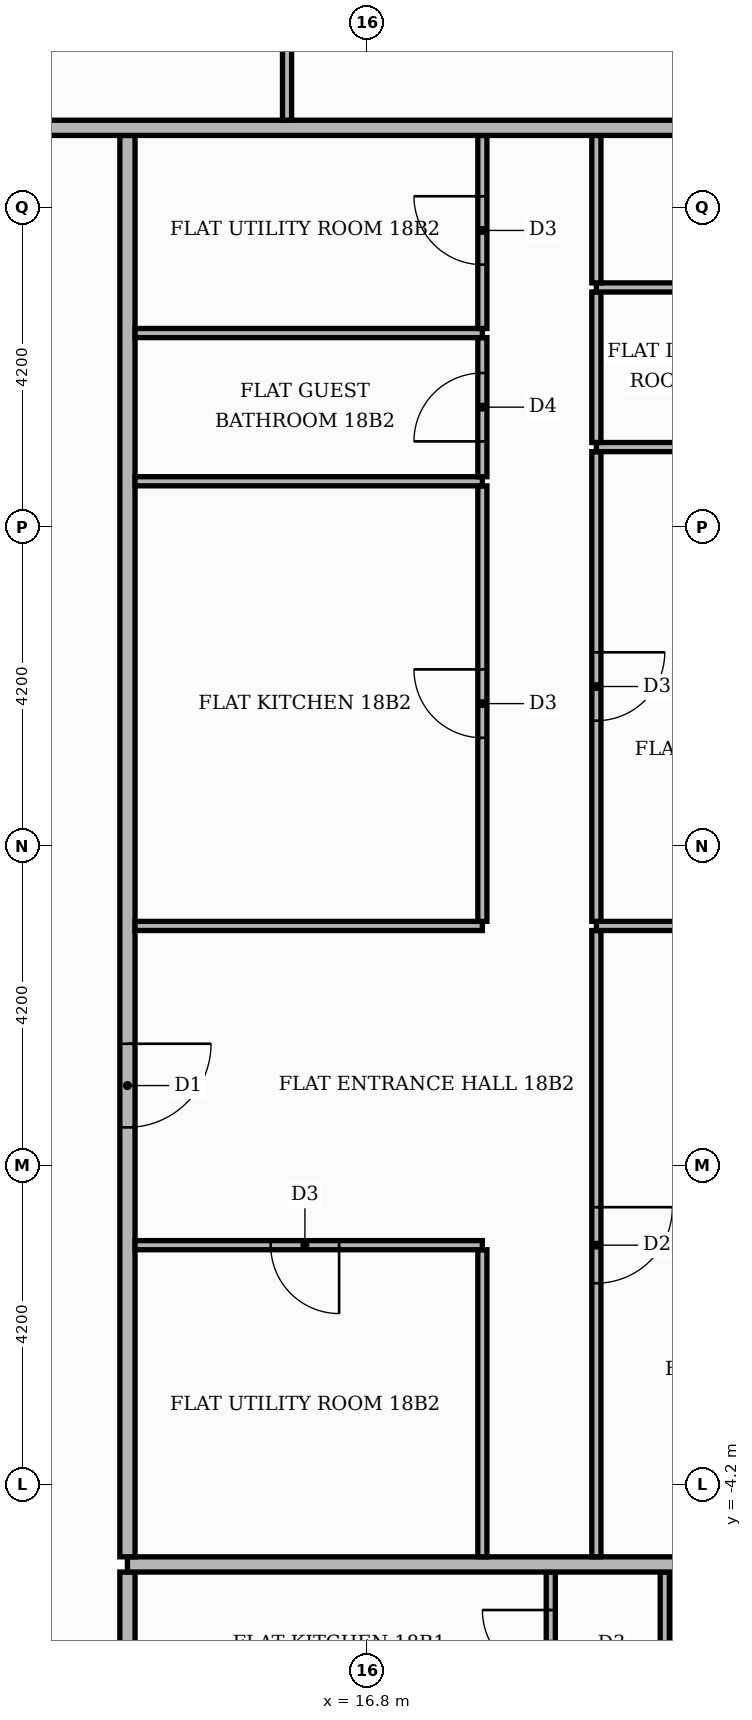
"""IFC4 building model, lengths in metres.
Left out: names, types, materials, properties, quantities, classifications, styles, units other than length and angle.
Written with IfcOpenShell. Run it as: python <this file> out.ifc"""

import sys

from ifc_helpers import new_model, si_unit, direction, frame, frame_2d, origin, place, context, subcontext, project, spatial, rectangle, extrude, element, fill, save


model = new_model("IFC4")
c1 = context("Model", 3, precision=1e-05, world=origin(), true_north=direction((0.0, 1.0)))
c2 = subcontext(c1, "Body", "Model", "MODEL_VIEW")
j1 = project(units=[si_unit("LENGTHUNIT", "METRE"), si_unit("PLANEANGLEUNIT", "RADIAN")], contexts=[c1])
p1 = place(None, origin())
s1 = spatial("IfcSite", under=j1, at=p1, CompositionType="ELEMENT")
p2 = place(p1, origin())
s2 = spatial("IfcBuilding", under=s1, at=p2, CompositionType="ELEMENT")
p3 = place(p2, frame((0.0, 0.0, 79.2)))
s3 = spatial("IfcBuildingStorey", under=s2, at=p3, CompositionType="ELEMENT", Elevation=79.2)
p4 = place(p3, frame((13.65, -13.55, 0.0), z_axis=(0.0, 0.0, 1.0), x_axis=(0.0, 1.0, 0.0)))
e1 = element("IfcWall", 1, at=p4, inside=s3, PredefinedType="PARTITIONING", context=c2, shape_type="SweptSolid", body=[
    extrude(rectangle(XDim=8.2, YDim=0.2, at=frame_2d((4.1, 0.0))), origin(), (0.0, 0.0, 1.0), 3.48),
])
p5 = place(p4, frame((1.45, 0.0, 0.0)))
e2 = element("IfcOpeningElement", 2, at=p5, cuts=e1, PredefinedType="OPENING", context=c2, shape_type="SweptSolid", body=[
    extrude(rectangle(XDim=1.1, YDim=2.4, at=frame_2d((0.55, 1.2))), frame((0.0, 0.11, 0.0), z_axis=(0.0, -1.0, 0.0), x_axis=(1.0, 0.0, 0.0)), (0.0, 0.0, 1.0), 0.22),
])
p6 = place(p3, frame((19.22, -7.29, 0.0), z_axis=(0.0, 0.0, 1.0), x_axis=(0.0, 1.0, 0.0)))
e3 = element("IfcWall", 3, at=p6, inside=s3, PredefinedType="PARTITIONING", context=c2, shape_type="SweptSolid", body=[
    extrude(rectangle(XDim=1.94, YDim=0.12, at=frame_2d((0.97, 0.0))), origin(), (0.0, 0.0, 1.0), 3.48),
])
p7 = place(p6, frame((0.54, 0.0, 0.0)))
e4 = element("IfcOpeningElement", 4, at=p7, cuts=e3, PredefinedType="OPENING", context=c2, shape_type="SweptSolid", body=[
    extrude(rectangle(XDim=0.9, YDim=2.1, at=frame_2d((0.45, 1.05))), frame((0.0, 0.07, 0.0), z_axis=(0.0, -1.0, 0.0), x_axis=(1.0, 0.0, 0.0)), (0.0, 0.0, 1.0), 0.14),
])
p8 = place(p3, frame((20.72, -7.29, 0.0), z_axis=(0.0, 0.0, 1.0), x_axis=(0.0, 1.0, 0.0)))
e5 = element("IfcWall", 5, at=p8, inside=s3, PredefinedType="PARTITIONING", context=c2, shape_type="SweptSolid", body=[
    extrude(rectangle(XDim=1.94, YDim=0.12, at=frame_2d((0.97, 0.0))), origin(), (0.0, 0.0, 1.0), 3.48),
])
p9 = place(p3, frame((13.65, -5.25, 0.0), z_axis=(0.0, 0.0, 1.0), x_axis=(1.0, 0.0, 0.0)))
e6 = element("IfcWall", 6, at=p9, inside=s3, PredefinedType="PARTITIONING", context=c2, shape_type="SweptSolid", body=[
    extrude(rectangle(XDim=11.77, YDim=0.2, at=frame_2d((5.885, 0.0))), origin(), (0.0, 0.0, 1.0), 3.48),
])
p10 = place(p3, frame((13.65, -5.15, 0.0), z_axis=(0.0, 0.0, 1.0), x_axis=(0.0, 1.0, 0.0)))
e7 = element("IfcWall", 7, at=p10, inside=s3, PredefinedType="PARTITIONING", context=c2, shape_type="SweptSolid", body=[
    extrude(rectangle(XDim=18.7, YDim=0.2, at=frame_2d((9.35, 0.0))), origin(), (0.0, 0.0, 1.0), 3.48),
])
p11 = place(p10, frame((5.65, 0.0, 0.0)))
e8 = element("IfcOpeningElement", 8, at=p11, cuts=e7, PredefinedType="OPENING", context=c2, shape_type="SweptSolid", body=[
    extrude(rectangle(XDim=1.1, YDim=2.4, at=frame_2d((0.55, 1.2))), frame((0.0, 0.11, 0.0), z_axis=(0.0, -1.0, 0.0), x_axis=(1.0, 0.0, 0.0)), (0.0, 0.0, 1.0), 0.22),
])
p12 = place(p3, frame((18.32, -5.15, 0.0), z_axis=(0.0, 0.0, 1.0), x_axis=(0.0, 1.0, 0.0)))
e9 = element("IfcWall", 9, at=p12, inside=s3, PredefinedType="PARTITIONING", context=c2, shape_type="SweptSolid", body=[
    extrude(rectangle(XDim=4.04, YDim=0.12, at=frame_2d((2.02, 0.0))), origin(), (0.0, 0.0, 1.0), 3.48),
])
p13 = place(p3, frame((19.82, -5.15, 0.0), z_axis=(0.0, 0.0, 1.0), x_axis=(0.0, 1.0, 0.0)))
e10 = element("IfcWall", 10, at=p13, inside=s3, PredefinedType="PARTITIONING", context=c2, shape_type="SweptSolid", body=[
    extrude(rectangle(XDim=8.24, YDim=0.12, at=frame_2d((4.12, 0.0))), origin(), (0.0, 0.0, 1.0), 3.48),
])
p14 = place(p13, frame((3.6, 0.0, 0.0)))
e11 = element("IfcOpeningElement", 11, at=p14, cuts=e10, PredefinedType="OPENING", context=c2, shape_type="SweptSolid", body=[
    extrude(rectangle(XDim=1.0, YDim=2.1, at=frame_2d((0.5, 1.05))), frame((0.0, 0.07, 0.0), z_axis=(0.0, -1.0, 0.0), x_axis=(1.0, 0.0, 0.0)), (0.0, 0.0, 1.0), 0.14),
])
p15 = place(p3, frame((13.75, -1.05, 0.0), z_axis=(0.0, 0.0, 1.0), x_axis=(1.0, 0.0, 0.0)))
e12 = element("IfcWall", 12, at=p15, inside=s3, PredefinedType="PARTITIONING", context=c2, shape_type="SweptSolid", body=[
    extrude(rectangle(XDim=4.57, YDim=0.12, at=frame_2d((2.285, 0.0))), origin(), (0.0, 0.0, 1.0), 3.48),
])
p16 = place(p15, frame((1.785, 0.0, 0.0)))
e13 = element("IfcOpeningElement", 13, at=p16, cuts=e12, PredefinedType="OPENING", context=c2, shape_type="SweptSolid", body=[
    extrude(rectangle(XDim=0.9, YDim=2.1, at=frame_2d((0.45, 1.05))), frame((0.0, 0.07, 0.0), z_axis=(0.0, -1.0, 0.0), x_axis=(1.0, 0.0, 0.0)), (0.0, 0.0, 1.0), 0.14),
])
p17 = place(p3, frame((13.75, 3.15, 0.0), z_axis=(0.0, 0.0, 1.0), x_axis=(1.0, 0.0, 0.0)))
e14 = element("IfcWall", 14, at=p17, inside=s3, PredefinedType="PARTITIONING", context=c2, shape_type="SweptSolid", body=[
    extrude(rectangle(XDim=4.57, YDim=0.12, at=frame_2d((2.285, 0.0))), origin(), (0.0, 0.0, 1.0), 3.48),
])
p18 = place(p3, frame((19.82, 3.15, 0.0), z_axis=(0.0, 0.0, 1.0), x_axis=(1.0, 0.0, 0.0)))
e15 = element("IfcWall", 15, at=p18, inside=s3, PredefinedType="PARTITIONING", context=c2, shape_type="SweptSolid", body=[
    extrude(rectangle(XDim=5.6, YDim=0.12, at=frame_2d((2.8, 0.0))), origin(), (0.0, 0.0, 1.0), 3.48),
])
p19 = place(p3, frame((18.32, 3.21, 0.0), z_axis=(0.0, 0.0, 1.0), x_axis=(0.0, 1.0, 0.0)))
e16 = element("IfcWall", 16, at=p19, inside=s3, PredefinedType="PARTITIONING", context=c2, shape_type="SweptSolid", body=[
    extrude(rectangle(XDim=5.73, YDim=0.12, at=frame_2d((2.865, 0.0))), origin(), (0.0, 0.0, 1.0), 3.48),
])
p20 = place(p19, frame((2.415, 0.0, 0.0)))
e17 = element("IfcOpeningElement", 17, at=p20, cuts=e16, PredefinedType="OPENING", context=c2, shape_type="SweptSolid", body=[
    extrude(rectangle(XDim=0.9, YDim=2.1, at=frame_2d((0.45, 1.05))), frame((0.0, 0.07, 0.0), z_axis=(0.0, -1.0, 0.0), x_axis=(1.0, 0.0, 0.0)), (0.0, 0.0, 1.0), 0.14),
])
p21 = place(p3, frame((19.82, 3.21, 0.0), z_axis=(0.0, 0.0, 1.0), x_axis=(0.0, 1.0, 0.0)))
e18 = element("IfcWall", 18, at=p21, inside=s3, PredefinedType="PARTITIONING", context=c2, shape_type="SweptSolid", body=[
    extrude(rectangle(XDim=6.18, YDim=0.12, at=frame_2d((3.09, 0.0))), origin(), (0.0, 0.0, 1.0), 3.48),
])
p22 = place(p21, frame((2.64, 0.0, 0.0)))
e19 = element("IfcOpeningElement", 19, at=p22, cuts=e18, PredefinedType="OPENING", context=c2, shape_type="SweptSolid", body=[
    extrude(rectangle(XDim=0.9, YDim=2.1, at=frame_2d((0.45, 1.05))), frame((0.0, 0.07, 0.0), z_axis=(0.0, -1.0, 0.0), x_axis=(1.0, 0.0, 0.0)), (0.0, 0.0, 1.0), 0.14),
])
p23 = place(p3, frame((13.75, 9.0, 0.0), z_axis=(0.0, 0.0, 1.0), x_axis=(1.0, 0.0, 0.0)))
e20 = element("IfcWall", 20, at=p23, inside=s3, PredefinedType="PARTITIONING", context=c2, shape_type="SweptSolid", body=[
    extrude(rectangle(XDim=4.57, YDim=0.12, at=frame_2d((2.285, 0.0))), origin(), (0.0, 0.0, 1.0), 3.48),
])
p24 = place(p3, frame((18.32, 9.06, 0.0), z_axis=(0.0, 0.0, 1.0), x_axis=(0.0, 1.0, 0.0)))
e21 = element("IfcWall", 21, at=p24, inside=s3, PredefinedType="PARTITIONING", context=c2, shape_type="SweptSolid", body=[
    extrude(rectangle(XDim=1.83, YDim=0.12, at=frame_2d((0.915, 0.0))), origin(), (0.0, 0.0, 1.0), 3.48),
])
p25 = place(p24, frame((0.465, 0.0, 0.0)))
e22 = element("IfcOpeningElement", 22, at=p25, cuts=e21, PredefinedType="OPENING", context=c2, shape_type="SweptSolid", body=[
    extrude(rectangle(XDim=0.9, YDim=2.1, at=frame_2d((0.45, 1.05))), frame((0.0, 0.07, 0.0), z_axis=(0.0, -1.0, 0.0), x_axis=(1.0, 0.0, 0.0)), (0.0, 0.0, 1.0), 0.14),
])
p26 = place(p3, frame((19.82, 9.45, 0.0), z_axis=(0.0, 0.0, 1.0), x_axis=(1.0, 0.0, 0.0)))
e23 = element("IfcWall", 23, at=p26, inside=s3, PredefinedType="PARTITIONING", context=c2, shape_type="SweptSolid", body=[
    extrude(rectangle(XDim=5.6, YDim=0.12, at=frame_2d((2.8, 0.0))), origin(), (0.0, 0.0, 1.0), 3.48),
])
p27 = place(p26, frame((2.5, 0.0, 0.0)))
e24 = element("IfcOpeningElement", 24, at=p27, cuts=e23, PredefinedType="OPENING", context=c2, shape_type="SweptSolid", body=[
    extrude(rectangle(XDim=0.9, YDim=2.1, at=frame_2d((0.45, 1.05))), frame((0.0, 0.07, 0.0), z_axis=(0.0, -1.0, 0.0), x_axis=(1.0, 0.0, 0.0)), (0.0, 0.0, 1.0), 0.14),
])
p28 = place(p3, frame((19.82, 9.51, 0.0), z_axis=(0.0, 0.0, 1.0), x_axis=(0.0, 1.0, 0.0)))
e25 = element("IfcWall", 25, at=p28, inside=s3, PredefinedType="PARTITIONING", context=c2, shape_type="SweptSolid", body=[
    extrude(rectangle(XDim=1.98, YDim=0.12, at=frame_2d((0.99, 0.0))), origin(), (0.0, 0.0, 1.0), 3.48),
])
p29 = place(p3, frame((13.75, 10.95, 0.0), z_axis=(0.0, 0.0, 1.0), x_axis=(1.0, 0.0, 0.0)))
e26 = element("IfcWall", 26, at=p29, inside=s3, PredefinedType="PARTITIONING", context=c2, shape_type="SweptSolid", body=[
    extrude(rectangle(XDim=4.57, YDim=0.12, at=frame_2d((2.285, 0.0))), origin(), (0.0, 0.0, 1.0), 3.48),
])
p30 = place(p3, frame((18.32, 11.01, 0.0), z_axis=(0.0, 0.0, 1.0), x_axis=(0.0, 1.0, 0.0)))
e27 = element("IfcWall", 27, at=p30, inside=s3, PredefinedType="PARTITIONING", context=c2, shape_type="SweptSolid", body=[
    extrude(rectangle(XDim=2.54, YDim=0.12, at=frame_2d((1.27, 0.0))), origin(), (0.0, 0.0, 1.0), 3.48),
])
p31 = place(p30, frame((0.84, 0.0, 0.0)))
e28 = element("IfcOpeningElement", 28, at=p31, cuts=e27, PredefinedType="OPENING", context=c2, shape_type="SweptSolid", body=[
    extrude(rectangle(XDim=0.9, YDim=2.1, at=frame_2d((0.45, 1.05))), frame((0.0, 0.07, 0.0), z_axis=(0.0, -1.0, 0.0), x_axis=(1.0, 0.0, 0.0)), (0.0, 0.0, 1.0), 0.14),
])
p32 = place(p3, frame((19.82, 11.55, 0.0), z_axis=(0.0, 0.0, 1.0), x_axis=(1.0, 0.0, 0.0)))
e29 = element("IfcWall", 29, at=p32, inside=s3, PredefinedType="PARTITIONING", context=c2, shape_type="SweptSolid", body=[
    extrude(rectangle(XDim=5.6, YDim=0.12, at=frame_2d((2.8, 0.0))), origin(), (0.0, 0.0, 1.0), 3.48),
])
p33 = place(p32, frame((2.5, 0.0, 0.0)))
e30 = element("IfcOpeningElement", 30, at=p33, cuts=e29, PredefinedType="OPENING", context=c2, shape_type="SweptSolid", body=[
    extrude(rectangle(XDim=0.9, YDim=2.1, at=frame_2d((0.45, 1.05))), frame((0.0, 0.07, 0.0), z_axis=(0.0, -1.0, 0.0), x_axis=(1.0, 0.0, 0.0)), (0.0, 0.0, 1.0), 0.14),
])
p34 = place(p3, frame((19.82, 11.61, 0.0), z_axis=(0.0, 0.0, 1.0), x_axis=(0.0, 1.0, 0.0)))
e31 = element("IfcWall", 31, at=p34, inside=s3, PredefinedType="PARTITIONING", context=c2, shape_type="SweptSolid", body=[
    extrude(rectangle(XDim=1.94, YDim=0.12, at=frame_2d((0.97, 0.0))), origin(), (0.0, 0.0, 1.0), 3.48),
])
p35 = place(p3, frame((-13.65, 13.65, 0.0), z_axis=(0.0, 0.0, 1.0), x_axis=(1.0, 0.0, 0.0)))
e32 = element("IfcWall", 32, at=p35, inside=s3, PredefinedType="PARTITIONING", context=c2, shape_type="SweptSolid", body=[
    extrude(rectangle(XDim=39.07, YDim=0.2, at=frame_2d((19.535, 0.0))), origin(), (0.0, 0.0, 1.0), 3.48),
])
p36 = place(p35, frame((24.65, 0.0, 0.0)))
e33 = element("IfcOpeningElement", 33, at=p36, cuts=e32, PredefinedType="OPENING", context=c2, shape_type="SweptSolid", body=[
    extrude(rectangle(XDim=1.1, YDim=2.4, at=frame_2d((0.55, 1.2))), frame((0.0, 0.11, 0.0), z_axis=(0.0, -1.0, 0.0), x_axis=(1.0, 0.0, 0.0)), (0.0, 0.0, 1.0), 0.22),
])
p37 = place(p35, frame((14.15, 0.0, 0.0)))
e34 = element("IfcOpeningElement", 34, at=p37, cuts=e32, PredefinedType="OPENING", context=c2, shape_type="SweptSolid", body=[
    extrude(rectangle(XDim=1.1, YDim=2.4, at=frame_2d((0.55, 1.2))), frame((0.0, 0.11, 0.0), z_axis=(0.0, -1.0, 0.0), x_axis=(1.0, 0.0, 0.0)), (0.0, 0.0, 1.0), 0.22),
])
p38 = place(p3, frame((15.75, 13.75, 0.0), z_axis=(0.0, 0.0, 1.0), x_axis=(0.0, 1.0, 0.0)))
e35 = element("IfcWall", 35, at=p38, inside=s3, PredefinedType="PARTITIONING", context=c2, shape_type="SweptSolid", body=[
    extrude(rectangle(XDim=6.01, YDim=0.12, at=frame_2d((3.005, 0.0))), origin(), (0.0, 0.0, 1.0), 3.48),
])
p39 = place(p38, frame((2.485, 0.0, 0.0)))
e36 = element("IfcOpeningElement", 36, at=p39, cuts=e35, PredefinedType="OPENING", context=c2, shape_type="SweptSolid", body=[
    extrude(rectangle(XDim=1.0, YDim=2.1, at=frame_2d((0.5, 1.05))), frame((0.0, 0.07, 0.0), z_axis=(0.0, -1.0, 0.0), x_axis=(1.0, 0.0, 0.0)), (0.0, 0.0, 1.0), 0.14),
])
p40 = place(p7, origin())
e37 = element("IfcDoor", 37, at=p40, inside=s3, OperationType="SINGLE_SWING_RIGHT", PredefinedType="DOOR", context=c2, shape_type="SweptSolid", body=[
    extrude(rectangle(XDim=0.9, YDim=2.1, at=frame_2d((0.45, 1.05))), frame((0.0, 0.025, 0.0), z_axis=(0.0, -1.0, 0.0), x_axis=(1.0, 0.0, 0.0)), (0.0, 0.0, 1.0), 0.05),
])
fill(e4, e37)
p41 = place(p11, frame((1.1, 0.0, 0.0), z_axis=(0.0, 0.0, 1.0), x_axis=(-1.0, 0.0, 0.0)))
e38 = element("IfcDoor", 38, at=p41, inside=s3, OperationType="SINGLE_SWING_RIGHT", PredefinedType="DOOR", context=c2, shape_type="SweptSolid", body=[
    extrude(rectangle(XDim=1.1, YDim=2.4, at=frame_2d((0.55, 1.2))), frame((0.0, 0.025, 0.0), z_axis=(0.0, -1.0, 0.0), x_axis=(1.0, 0.0, 0.0)), (0.0, 0.0, 1.0), 0.05),
])
fill(e8, e38)
p42 = place(p16, frame((0.9, 0.0, 0.0), z_axis=(0.0, 0.0, 1.0), x_axis=(-1.0, 0.0, 0.0)))
e39 = element("IfcDoor", 39, at=p42, inside=s3, OperationType="SINGLE_SWING_RIGHT", PredefinedType="DOOR", context=c2, shape_type="SweptSolid", body=[
    extrude(rectangle(XDim=0.9, YDim=2.1, at=frame_2d((0.45, 1.05))), frame((0.0, 0.025, 0.0), z_axis=(0.0, -1.0, 0.0), x_axis=(1.0, 0.0, 0.0)), (0.0, 0.0, 1.0), 0.05),
])
fill(e13, e39)
p43 = place(p20, origin())
e40 = element("IfcDoor", 40, at=p43, inside=s3, OperationType="SINGLE_SWING_RIGHT", PredefinedType="DOOR", context=c2, shape_type="SweptSolid", body=[
    extrude(rectangle(XDim=0.9, YDim=2.1, at=frame_2d((0.45, 1.05))), frame((0.0, 0.025, 0.0), z_axis=(0.0, -1.0, 0.0), x_axis=(1.0, 0.0, 0.0)), (0.0, 0.0, 1.0), 0.05),
])
fill(e17, e40)
p44 = place(p25, origin())
e41 = element("IfcDoor", 41, at=p44, inside=s3, OperationType="SINGLE_SWING_LEFT", PredefinedType="DOOR", context=c2, shape_type="SweptSolid", body=[
    extrude(rectangle(XDim=0.9, YDim=2.1, at=frame_2d((0.45, 1.05))), frame((0.0, 0.025, 0.0), z_axis=(0.0, -1.0, 0.0), x_axis=(1.0, 0.0, 0.0)), (0.0, 0.0, 1.0), 0.05),
])
fill(e22, e41)
p45 = place(p31, origin())
e42 = element("IfcDoor", 42, at=p45, inside=s3, OperationType="SINGLE_SWING_RIGHT", PredefinedType="DOOR", context=c2, shape_type="SweptSolid", body=[
    extrude(rectangle(XDim=0.9, YDim=2.1, at=frame_2d((0.45, 1.05))), frame((0.0, 0.025, 0.0), z_axis=(0.0, -1.0, 0.0), x_axis=(1.0, 0.0, 0.0)), (0.0, 0.0, 1.0), 0.05),
])
fill(e28, e42)
p46 = place(p14, frame((1.0, 0.0, 0.0), z_axis=(0.0, 0.0, 1.0), x_axis=(-1.0, 0.0, 0.0)))
e43 = element("IfcDoor", 43, at=p46, inside=s3, OperationType="SINGLE_SWING_RIGHT", PredefinedType="DOOR", context=c2, shape_type="SweptSolid", body=[
    extrude(rectangle(XDim=1.0, YDim=2.1, at=frame_2d((0.5, 1.05))), frame((0.0, 0.025, 0.0), z_axis=(0.0, -1.0, 0.0), x_axis=(1.0, 0.0, 0.0)), (0.0, 0.0, 1.0), 0.05),
])
fill(e11, e43)
p47 = place(p22, frame((0.9, 0.0, 0.0), z_axis=(0.0, 0.0, 1.0), x_axis=(-1.0, 0.0, 0.0)))
e44 = element("IfcDoor", 44, at=p47, inside=s3, OperationType="SINGLE_SWING_RIGHT", PredefinedType="DOOR", context=c2, shape_type="SweptSolid", body=[
    extrude(rectangle(XDim=0.9, YDim=2.1, at=frame_2d((0.45, 1.05))), frame((0.0, 0.025, 0.0), z_axis=(0.0, -1.0, 0.0), x_axis=(1.0, 0.0, 0.0)), (0.0, 0.0, 1.0), 0.05),
])
fill(e19, e44)
save(model, sys.argv[1])
